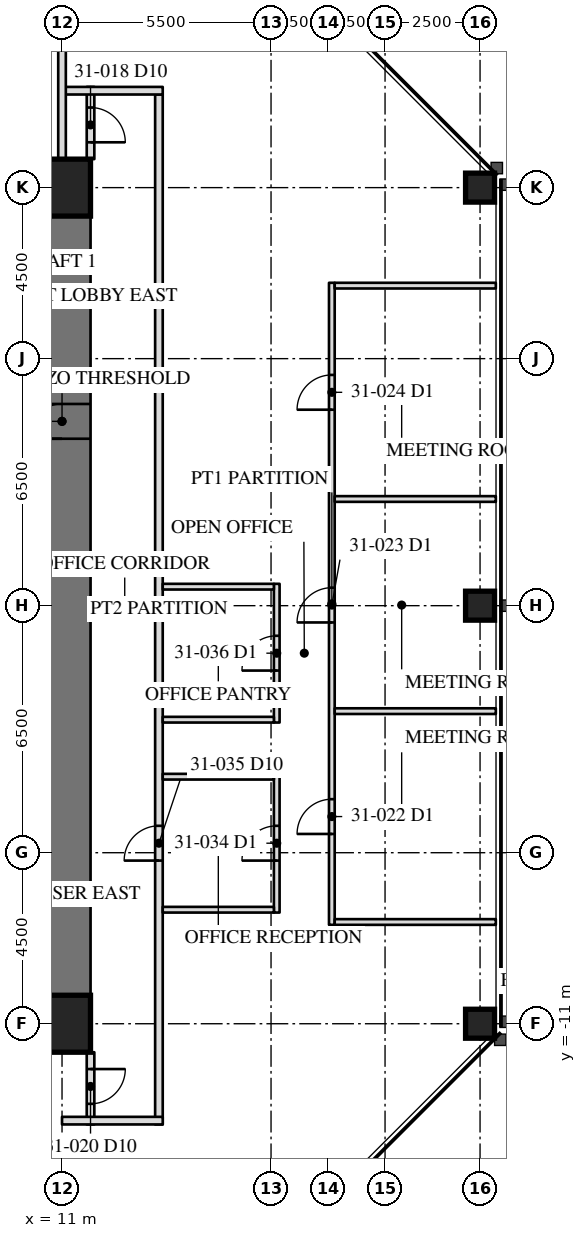
"""IFC4 building model, lengths in metres.
Left out: names, types, materials, properties, quantities, classifications, styles, units other than length and angle.
Written with IfcOpenShell. Run it as: python <this file> out.ifc"""

import sys

from ifc_helpers import new_model, si_unit, direction, frame, frame_2d, origin, origin_2d, place, context, subcontext, project, spatial, rectangle, hollow_rectangle, extrude, element, fill, save


model = new_model("IFC4")
c1 = context("Model", 3, precision=1e-05, world=origin(), true_north=direction((0.0, 1.0)))
c2 = subcontext(c1, "Body", "Model", "MODEL_VIEW")
j1 = project(units=[si_unit("LENGTHUNIT", "METRE"), si_unit("PLANEANGLEUNIT", "RADIAN")], contexts=[c1])
p1 = place(None, origin())
s1 = spatial("IfcSite", under=j1, at=p1, CompositionType="ELEMENT")
p2 = place(p1, origin())
s2 = spatial("IfcBuilding", under=s1, at=p2, CompositionType="ELEMENT")
p3 = place(p2, frame((0.0, 0.0, 133.6)))
s3 = spatial("IfcBuildingStorey", under=s2, at=p3, CompositionType="ELEMENT", Elevation=133.6)
for number, where, z_axis, x_axis in (
    (1, (22.0, -11.0, 0.0), (0.0, 0.0, 1.0), (0.0, 1.0, 0.0)),
    (2, (22.0, 0.0, 0.0), (0.0, 0.0, 1.0), (0.0, 1.0, 0.0)),
    (3, (22.0, 11.0, 0.0), (0.0, 0.0, 1.0), (0.0, 1.0, 0.0)),
):
    element("IfcColumn", number, at=place(p3, frame(where, z_axis=z_axis, x_axis=x_axis)), inside=s3, PredefinedType="COLUMN", context=c2, shape_type="SweptSolid", body=[
        extrude(hollow_rectangle(XDim=0.762, YDim=0.762, WallThickness=0.076, at=origin_2d()), origin(), (0.0, 0.0, 1.0), 4.1),
    ])
p4 = place(p3, frame((11.0, -11.0, 0.0), z_axis=(0.0, 0.0, 1.0), x_axis=(0.0, 1.0, 0.0)))
e4 = element("IfcWall", 4, at=p4, inside=s3, PredefinedType="SHEAR", context=c2, shape_type="SweptSolid", body=[
    extrude(rectangle(XDim=22.0, YDim=1.5, at=frame_2d((11.0, 0.0))), origin(), (0.0, 0.0, 1.0), 4.1),
])
p5 = place(p4, frame((15.393, 0.0, 0.0)))
e5 = element("IfcOpeningElement", 5, at=p5, cuts=e4, PredefinedType="OPENING", context=c2, shape_type="SweptSolid", body=[
    extrude(rectangle(XDim=0.915, YDim=2.134, at=frame_2d((0.458, 1.067))), frame((0.0, 0.76, 0.0), z_axis=(0.0, -1.0, 0.0), x_axis=(1.0, 0.0, 0.0)), (0.0, 0.0, 1.0), 1.52),
])
for number, where, z_axis, x_axis in (
    (6, (11.0, 11.0, 0.0), (0.0, 0.0, 1.0), (-1.0, 0.0, 0.0)),
    (7, (6.5, -11.0, 0.0), (0.0, 0.0, 1.0), (1.0, 0.0, 0.0)),
):
    element("IfcWall", number, at=place(p3, frame(where, z_axis=z_axis, x_axis=x_axis)), inside=s3, PredefinedType="SHEAR", context=c2, shape_type="SweptSolid", body=[
        extrude(rectangle(XDim=4.5, YDim=1.5, at=frame_2d((2.25, 0.0))), origin(), (0.0, 0.0, 1.0), 4.1),
    ])
for number, where, z_axis, x_axis in (
    (8, (11.0, 11.0, 0.0), (0.0, 0.0, 1.0), (1.0, 0.0, 0.0)),
    (9, (11.0, -11.0, 0.0), (0.0, 0.0, 1.0), (1.0, 0.0, 0.0)),
):
    element("IfcColumn", number, at=place(p3, frame(where, z_axis=z_axis, x_axis=x_axis)), inside=s3, PredefinedType="COLUMN", context=c2, shape_type="SweptSolid", body=[
        extrude(hollow_rectangle(XDim=1.499, YDim=1.499, WallThickness=0.102, at=origin_2d()), origin(), (0.0, 0.0, 1.0), 4.1),
    ])
p6 = place(p3, frame((13.55, -13.65, 0.0), z_axis=(0.0, 0.0, 1.0), x_axis=(0.0, 1.0, 0.0)))
e10 = element("IfcWall", 10, at=p6, inside=s3, PredefinedType="PARTITIONING", context=c2, shape_type="SweptSolid", body=[
    extrude(rectangle(XDim=27.1, YDim=0.2, at=frame_2d((13.55, 0.0))), origin(), (0.0, 0.0, 1.0), 3.91),
])
p7 = place(p6, frame((6.942, 0.0, 0.0)))
e11 = element("IfcOpeningElement", 11, at=p7, cuts=e10, PredefinedType="OPENING", context=c2, shape_type="SweptSolid", body=[
    extrude(rectangle(XDim=0.915, YDim=2.134, at=frame_2d((0.458, 1.067))), frame((0.0, 0.11, 0.0), z_axis=(0.0, -1.0, 0.0), x_axis=(1.0, 0.0, 0.0)), (0.0, 0.0, 1.0), 0.22),
])
p8 = place(p3, frame((11.75, 11.75, 0.0), z_axis=(0.0, 0.0, 1.0), x_axis=(0.0, 1.0, 0.0)))
e12 = element("IfcWall", 12, at=p8, inside=s3, PredefinedType="PARTITIONING", context=c2, shape_type="SweptSolid", body=[
    extrude(rectangle(XDim=1.9, YDim=0.2, at=frame_2d((0.95, 0.0))), origin(), (0.0, 0.0, 1.0), 3.91),
])
p9 = place(p8, frame((0.442, 0.0, 0.0)))
e13 = element("IfcOpeningElement", 13, at=p9, cuts=e12, PredefinedType="OPENING", context=c2, shape_type="SweptSolid", body=[
    extrude(rectangle(XDim=0.915, YDim=2.134, at=frame_2d((0.458, 1.067))), frame((0.0, 0.11, 0.0), z_axis=(0.0, -1.0, 0.0), x_axis=(1.0, 0.0, 0.0)), (0.0, 0.0, 1.0), 0.22),
])
p10 = place(p3, frame((11.0, 13.55, 0.0), z_axis=(0.0, 0.0, 1.0), x_axis=(1.0, 0.0, 0.0)))
e14 = element("IfcWall", 14, at=p10, inside=s3, PredefinedType="PARTITIONING", context=c2, shape_type="SweptSolid", body=[
    extrude(rectangle(XDim=2.65, YDim=0.2, at=frame_2d((1.325, 0.0))), origin(), (0.0, 0.0, 1.0), 3.91),
])
p11 = place(p3, frame((11.75, -11.75, 0.0), z_axis=(0.0, 0.0, 1.0), x_axis=(0.0, -1.0, 0.0)))
e15 = element("IfcWall", 15, at=p11, inside=s3, PredefinedType="PARTITIONING", context=c2, shape_type="SweptSolid", body=[
    extrude(rectangle(XDim=1.9, YDim=0.2, at=frame_2d((0.95, 0.0))), origin(), (0.0, 0.0, 1.0), 3.91),
])
p12 = place(p11, frame((0.442, 0.0, 0.0)))
e16 = element("IfcOpeningElement", 16, at=p12, cuts=e15, PredefinedType="OPENING", context=c2, shape_type="SweptSolid", body=[
    extrude(rectangle(XDim=0.915, YDim=2.134, at=frame_2d((0.458, 1.067))), frame((0.0, 0.11, 0.0), z_axis=(0.0, -1.0, 0.0), x_axis=(1.0, 0.0, 0.0)), (0.0, 0.0, 1.0), 0.22),
])
p13 = place(p3, frame((11.0, -13.55, 0.0), z_axis=(0.0, 0.0, 1.0), x_axis=(1.0, 0.0, 0.0)))
e17 = element("IfcWall", 17, at=p13, inside=s3, PredefinedType="PARTITIONING", context=c2, shape_type="SweptSolid", body=[
    extrude(rectangle(XDim=2.65, YDim=0.2, at=frame_2d((1.325, 0.0))), origin(), (0.0, 0.0, 1.0), 3.91),
])
p14 = place(p3, frame((11.0, 11.75, 0.0), z_axis=(0.0, 0.0, 1.0), x_axis=(0.0, 1.0, 0.0)))
e18 = element("IfcWall", 18, at=p14, inside=s3, PredefinedType="PARTITIONING", context=c2, shape_type="SweptSolid", body=[
    extrude(rectangle(XDim=10.665, YDim=0.2, at=frame_2d((5.333, 0.0))), origin(), (0.0, 0.0, 1.0), 3.326),
])
p15 = place(p3, frame((18.1, -8.398, 0.0), z_axis=(0.0, 0.0, 1.0), x_axis=(0.0, 1.0, 0.0)))
e19 = element("IfcWall", 19, at=p15, inside=s3, PredefinedType="PARTITIONING", context=c2, shape_type="SweptSolid", body=[
    extrude(rectangle(XDim=16.894, YDim=0.15, at=frame_2d((8.447, 0.0))), origin(), (0.0, 0.0, 1.0), 3.91),
])
p16 = place(p15, frame((2.392, 0.0, 0.0)))
e20 = element("IfcOpeningElement", 20, at=p16, cuts=e19, PredefinedType="OPENING", context=c2, shape_type="SweptSolid", body=[
    extrude(rectangle(XDim=0.915, YDim=2.134, at=frame_2d((0.458, 1.067))), frame((0.0, 0.085, 0.0), z_axis=(0.0, -1.0, 0.0), x_axis=(1.0, 0.0, 0.0)), (0.0, 0.0, 1.0), 0.17),
])
p17 = place(p15, frame((7.957, 0.0, 0.0)))
e21 = element("IfcOpeningElement", 21, at=p17, cuts=e19, PredefinedType="OPENING", context=c2, shape_type="SweptSolid", body=[
    extrude(rectangle(XDim=0.915, YDim=2.134, at=frame_2d((0.458, 1.067))), frame((0.0, 0.085, 0.0), z_axis=(0.0, -1.0, 0.0), x_axis=(1.0, 0.0, 0.0)), (0.0, 0.0, 1.0), 0.17),
])
p18 = place(p15, frame((13.554, 0.0, 0.0)))
e22 = element("IfcOpeningElement", 22, at=p18, cuts=e19, PredefinedType="OPENING", context=c2, shape_type="SweptSolid", body=[
    extrude(rectangle(XDim=0.915, YDim=2.134, at=frame_2d((0.458, 1.067))), frame((0.0, 0.085, 0.0), z_axis=(0.0, -1.0, 0.0), x_axis=(1.0, 0.0, 0.0)), (0.0, 0.0, 1.0), 0.17),
])
for number, where, z_axis, x_axis in (
    (23, (18.175, -8.323, 0.0), (0.0, 0.0, 1.0), (1.0, 0.0, 0.0)),
    (24, (18.175, -2.775, 0.0), (0.0, 0.0, 1.0), (1.0, 0.0, 0.0)),
    (25, (18.175, 2.807, 0.0), (0.0, 0.0, 1.0), (1.0, 0.0, 0.0)),
    (26, (18.175, 8.421, 0.0), (0.0, 0.0, 1.0), (1.0, 0.0, 0.0)),
):
    element("IfcWall", number, at=place(p3, frame(where, z_axis=z_axis, x_axis=x_axis)), inside=s3, PredefinedType="PARTITIONING", context=c2, shape_type="SweptSolid", body=[
        extrude(rectangle(XDim=4.24, YDim=0.15, at=frame_2d((2.12, 0.0))), origin(), (0.0, 0.0, 1.0), 3.91),
    ])
p19 = place(p3, frame((16.65, -8.075, 0.0), z_axis=(0.0, 0.0, 1.0), x_axis=(0.0, 1.0, 0.0)))
e27 = element("IfcWall", 27, at=p19, inside=s3, PredefinedType="PARTITIONING", context=c2, shape_type="SweptSolid", body=[
    extrude(rectangle(XDim=3.65, YDim=0.15, at=frame_2d((1.825, 0.0))), origin(), (0.0, 0.0, 1.0), 3.91),
])
p20 = place(p19, frame((1.367, 0.0, 0.0)))
e28 = element("IfcOpeningElement", 28, at=p20, cuts=e27, PredefinedType="OPENING", context=c2, shape_type="SweptSolid", body=[
    extrude(rectangle(XDim=0.915, YDim=2.134, at=frame_2d((0.458, 1.067))), frame((0.0, 0.085, 0.0), z_axis=(0.0, -1.0, 0.0), x_axis=(1.0, 0.0, 0.0)), (0.0, 0.0, 1.0), 0.17),
])
for number, where, z_axis, x_axis in (
    (29, (16.575, -8.0, 0.0), (0.0, 0.0, 1.0), (-1.0, 0.0, 0.0)),
    (30, (16.575, -4.5, 0.0), (0.0, 0.0, 1.0), (-1.0, 0.0, 0.0)),
):
    element("IfcWall", number, at=place(p3, frame(where, z_axis=z_axis, x_axis=x_axis)), inside=s3, PredefinedType="PARTITIONING", context=c2, shape_type="SweptSolid", body=[
        extrude(rectangle(XDim=2.925, YDim=0.15, at=frame_2d((1.462, 0.0))), origin(), (0.0, 0.0, 1.0), 3.91),
    ])
p21 = place(p3, frame((16.65, -3.075, 0.0), z_axis=(0.0, 0.0, 1.0), x_axis=(0.0, 1.0, 0.0)))
e31 = element("IfcWall", 31, at=p21, inside=s3, PredefinedType="PARTITIONING", context=c2, shape_type="SweptSolid", body=[
    extrude(rectangle(XDim=3.65, YDim=0.15, at=frame_2d((1.825, 0.0))), origin(), (0.0, 0.0, 1.0), 3.91),
])
p22 = place(p21, frame((1.367, 0.0, 0.0)))
e32 = element("IfcOpeningElement", 32, at=p22, cuts=e31, PredefinedType="OPENING", context=c2, shape_type="SweptSolid", body=[
    extrude(rectangle(XDim=0.915, YDim=2.134, at=frame_2d((0.458, 1.067))), frame((0.0, 0.085, 0.0), z_axis=(0.0, -1.0, 0.0), x_axis=(1.0, 0.0, 0.0)), (0.0, 0.0, 1.0), 0.17),
])
for number, where, z_axis, x_axis in (
    (33, (16.575, -3.0, 0.0), (0.0, 0.0, 1.0), (-1.0, 0.0, 0.0)),
    (34, (16.575, 0.5, 0.0), (0.0, 0.0, 1.0), (-1.0, 0.0, 0.0)),
):
    element("IfcWall", number, at=place(p3, frame(where, z_axis=z_axis, x_axis=x_axis)), inside=s3, PredefinedType="PARTITIONING", context=c2, shape_type="SweptSolid", body=[
        extrude(rectangle(XDim=2.925, YDim=0.15, at=frame_2d((1.462, 0.0))), origin(), (0.0, 0.0, 1.0), 3.91),
    ])
p23 = place(p5, origin())
e35 = element("IfcDoor", 35, at=p23, inside=s3, OperationType="SINGLE_SWING_RIGHT", PredefinedType="DOOR", context=c2, shape_type="SweptSolid", body=[
    extrude(rectangle(XDim=0.915, YDim=2.134, at=frame_2d((0.458, 1.067))), frame((0.0, -0.675, 0.0), z_axis=(0.0, -1.0, 0.0), x_axis=(1.0, 0.0, 0.0)), (0.0, 0.0, 1.0), 0.05),
])
fill(e5, e35)
p24 = place(p9, frame((0.915, 0.0, 0.0), z_axis=(0.0, 0.0, 1.0), x_axis=(-1.0, 0.0, 0.0)))
e36 = element("IfcDoor", 36, at=p24, inside=s3, OperationType="SINGLE_SWING_LEFT", PredefinedType="DOOR", context=c2, shape_type="SweptSolid", body=[
    extrude(rectangle(XDim=0.915, YDim=2.134, at=frame_2d((0.458, 1.067))), frame((0.0, 0.025, 0.0), z_axis=(0.0, -1.0, 0.0), x_axis=(1.0, 0.0, 0.0)), (0.0, 0.0, 1.0), 0.05),
])
fill(e13, e36)
p25 = place(p12, origin())
e37 = element("IfcDoor", 37, at=p25, inside=s3, OperationType="SINGLE_SWING_LEFT", PredefinedType="DOOR", context=c2, shape_type="SweptSolid", body=[
    extrude(rectangle(XDim=0.915, YDim=2.134, at=frame_2d((0.458, 1.067))), frame((0.0, 0.025, 0.0), z_axis=(0.0, -1.0, 0.0), x_axis=(1.0, 0.0, 0.0)), (0.0, 0.0, 1.0), 0.05),
])
fill(e16, e37)
p26 = place(p16, origin())
e38 = element("IfcDoor", 38, at=p26, inside=s3, OperationType="SINGLE_SWING_LEFT", PredefinedType="DOOR", context=c2, shape_type="SweptSolid", body=[
    extrude(rectangle(XDim=0.915, YDim=2.134, at=frame_2d((0.458, 1.067))), frame((0.0, 0.025, 0.0), z_axis=(0.0, -1.0, 0.0), x_axis=(1.0, 0.0, 0.0)), (0.0, 0.0, 1.0), 0.05),
])
fill(e20, e38)
p27 = place(p17, origin())
e39 = element("IfcDoor", 39, at=p27, inside=s3, OperationType="SINGLE_SWING_LEFT", PredefinedType="DOOR", context=c2, shape_type="SweptSolid", body=[
    extrude(rectangle(XDim=0.915, YDim=2.134, at=frame_2d((0.458, 1.067))), frame((0.0, 0.025, 0.0), z_axis=(0.0, -1.0, 0.0), x_axis=(1.0, 0.0, 0.0)), (0.0, 0.0, 1.0), 0.05),
])
fill(e21, e39)
p28 = place(p18, origin())
e40 = element("IfcDoor", 40, at=p28, inside=s3, OperationType="SINGLE_SWING_LEFT", PredefinedType="DOOR", context=c2, shape_type="SweptSolid", body=[
    extrude(rectangle(XDim=0.915, YDim=2.134, at=frame_2d((0.458, 1.067))), frame((0.0, 0.025, 0.0), z_axis=(0.0, -1.0, 0.0), x_axis=(1.0, 0.0, 0.0)), (0.0, 0.0, 1.0), 0.05),
])
fill(e22, e40)
p29 = place(p20, origin())
e41 = element("IfcDoor", 41, at=p29, inside=s3, OperationType="SINGLE_SWING_LEFT", PredefinedType="DOOR", context=c2, shape_type="SweptSolid", body=[
    extrude(rectangle(XDim=0.915, YDim=2.134, at=frame_2d((0.458, 1.067))), frame((0.0, 0.025, 0.0), z_axis=(0.0, -1.0, 0.0), x_axis=(1.0, 0.0, 0.0)), (0.0, 0.0, 1.0), 0.05),
])
fill(e28, e41)
p30 = place(p7, origin())
e42 = element("IfcDoor", 42, at=p30, inside=s3, OperationType="SINGLE_SWING_LEFT", PredefinedType="DOOR", context=c2, shape_type="SweptSolid", body=[
    extrude(rectangle(XDim=0.915, YDim=2.134, at=frame_2d((0.458, 1.067))), frame((0.0, 0.025, 0.0), z_axis=(0.0, -1.0, 0.0), x_axis=(1.0, 0.0, 0.0)), (0.0, 0.0, 1.0), 0.05),
])
fill(e11, e42)
p31 = place(p22, origin())
e43 = element("IfcDoor", 43, at=p31, inside=s3, OperationType="SINGLE_SWING_LEFT", PredefinedType="DOOR", context=c2, shape_type="SweptSolid", body=[
    extrude(rectangle(XDim=0.915, YDim=2.134, at=frame_2d((0.458, 1.067))), frame((0.0, 0.025, 0.0), z_axis=(0.0, -1.0, 0.0), x_axis=(1.0, 0.0, 0.0)), (0.0, 0.0, 1.0), 0.05),
])
fill(e32, e43)
save(model, sys.argv[1])
